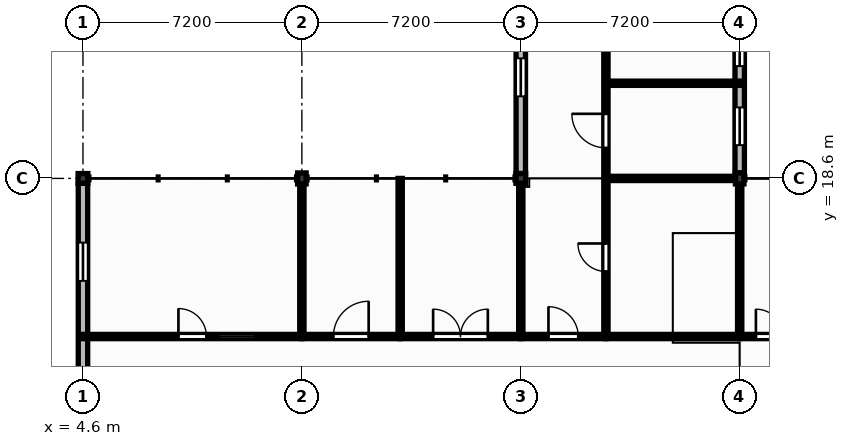
"""IFC4 building model, lengths in metres.
Left out: names, types, materials, properties, quantities, classifications, styles, units other than length and angle.
Written with IfcOpenShell. Run it as: python <this file> out.ifc"""

import sys

from ifc_helpers import new_model, si_unit, direction, frame, frame_2d, origin, origin_2d, place, context, subcontext, project, spatial, rectangle, extrude, element, fill, save


model = new_model("IFC4")
c1 = context("Model", 3, precision=1e-05, world=origin(), true_north=direction((0.0, 1.0)))
c2 = subcontext(c1, "Body", "Model", "MODEL_VIEW")
j1 = project(units=[si_unit("LENGTHUNIT", "METRE"), si_unit("PLANEANGLEUNIT", "RADIAN")], contexts=[c1])
p1 = place(None, origin())
s1 = spatial("IfcSite", under=j1, at=p1, CompositionType="ELEMENT")
p2 = place(p1, origin())
s2 = spatial("IfcBuilding", under=s1, at=p2, CompositionType="ELEMENT")
p3 = place(p2, frame((0.0, 0.0, 9.0)))
s3 = spatial("IfcBuildingStorey", under=s2, at=p3, CompositionType="ELEMENT", Elevation=9.0)
p4 = place(p3, frame((4.6, 18.6, 0.0), z_axis=(0.0, 0.0, 1.0), x_axis=(1.0, 0.0, 0.0)))
e1 = element("IfcColumn", 1, at=p4, inside=s3, PredefinedType="COLUMN", context=c2, shape_type="SweptSolid", body=[
    extrude(rectangle(XDim=0.32, YDim=0.32, at=origin_2d()), origin(), (0.0, 0.0, 1.0), 3.95),
])
p5 = place(p3, frame((11.8, 18.6, 0.0), z_axis=(0.0, 0.0, 1.0), x_axis=(1.0, 0.0, 0.0)))
e2 = element("IfcColumn", 2, at=p5, inside=s3, PredefinedType="COLUMN", context=c2, shape_type="SweptSolid", body=[
    extrude(rectangle(XDim=0.28, YDim=0.36, at=origin_2d()), origin(), (0.0, 0.0, 1.0), 3.95),
])
p6 = place(p3, frame((19.0, 18.6, 0.0), z_axis=(0.0, 0.0, 1.0), x_axis=(1.0, 0.0, 0.0)))
e3 = element("IfcColumn", 3, at=p6, inside=s3, PredefinedType="COLUMN", context=c2, shape_type="SweptSolid", body=[
    extrude(rectangle(XDim=0.32, YDim=0.32, at=origin_2d()), origin(), (0.0, 0.0, 1.0), 3.95),
])
p7 = place(p3, frame((26.2, 18.6, 0.0), z_axis=(0.0, 0.0, 1.0), x_axis=(1.0, 0.0, 0.0)))
e4 = element("IfcColumn", 4, at=p7, inside=s3, PredefinedType="COLUMN", context=c2, shape_type="SweptSolid", body=[
    extrude(rectangle(XDim=0.28, YDim=0.36, at=origin_2d()), origin(), (0.0, 0.0, 1.0), 3.95),
])
p8 = place(p3, frame((4.6, 11.58, 0.0), z_axis=(0.0, 0.0, 1.0), x_axis=(0.0, 1.0, 0.0)))
e5 = element("IfcWall", 5, at=p8, inside=s3, PredefinedType="SOLIDWALL", context=c2, shape_type="SweptSolid", body=[
    extrude(rectangle(XDim=6.86, YDim=0.31, at=frame_2d((3.43, 0.0))), origin(), (0.0, 0.0, 1.0), 3.49),
])
p9 = place(p8, frame((3.65, 0.0, 1.05)))
e6 = element("IfcOpeningElement", 6, at=p9, cuts=e5, PredefinedType="OPENING", context=c2, shape_type="SweptSolid", body=[
    extrude(rectangle(XDim=1.26, YDim=1.65, at=frame_2d((0.63, 0.825))), frame((0.0, 0.165, 0.0), z_axis=(0.0, -1.0, 0.0), x_axis=(1.0, 0.0, 0.0)), (0.0, 0.0, 1.0), 0.33),
])
p10 = place(p3, frame((19.0, 18.76, 0.0), z_axis=(0.0, 0.0, 1.0), x_axis=(0.0, 1.0, 0.0)))
e7 = element("IfcWall", 7, at=p10, inside=s3, PredefinedType="SOLIDWALL", context=c2, shape_type="SweptSolid", body=[
    extrude(rectangle(XDim=8.26, YDim=0.31, at=frame_2d((4.13, 0.0))), origin(), (0.0, 0.0, 1.0), 3.49),
])
p11 = place(p10, frame((2.54, 0.0, 1.35)))
e8 = element("IfcOpeningElement", 8, at=p11, cuts=e7, PredefinedType="OPENING", context=c2, shape_type="SweptSolid", body=[
    extrude(rectangle(XDim=1.25, YDim=1.4, at=frame_2d((0.625, 0.7))), frame((0.0, 0.165, 0.0), z_axis=(0.0, -1.0, 0.0), x_axis=(1.0, 0.0, 0.0)), (0.0, 0.0, 1.0), 0.33),
])
p12 = place(p10, frame((4.47, 0.0, 1.35)))
e9 = element("IfcOpeningElement", 9, at=p12, cuts=e7, PredefinedType="OPENING", context=c2, shape_type="SweptSolid", body=[
    extrude(rectangle(XDim=1.25, YDim=1.4, at=frame_2d((0.625, 0.7))), frame((0.0, 0.165, 0.0), z_axis=(0.0, -1.0, 0.0), x_axis=(1.0, 0.0, 0.0)), (0.0, 0.0, 1.0), 0.33),
])
p13 = place(p3, frame((26.2, 18.78, 0.0), z_axis=(0.0, 0.0, 1.0), x_axis=(0.0, 1.0, 0.0)))
e10 = element("IfcWall", 10, at=p13, inside=s3, PredefinedType="SOLIDWALL", context=c2, shape_type="SweptSolid", body=[
    extrude(rectangle(XDim=8.24, YDim=0.31, at=frame_2d((4.12, 0.0))), origin(), (0.0, 0.0, 1.0), 3.49),
])
p14 = place(p13, frame((0.915, 0.0, 1.0)))
e11 = element("IfcOpeningElement", 11, at=p14, cuts=e10, PredefinedType="OPENING", context=c2, shape_type="SweptSolid", body=[
    extrude(rectangle(XDim=1.24, YDim=1.8, at=frame_2d((0.62, 0.9))), frame((0.0, 0.165, 0.0), z_axis=(0.0, -1.0, 0.0), x_axis=(1.0, 0.0, 0.0)), (0.0, 0.0, 1.0), 0.33),
])
p15 = place(p13, frame((3.515, 0.0, 1.5)))
e12 = element("IfcOpeningElement", 12, at=p15, cuts=e10, PredefinedType="OPENING", context=c2, shape_type="SweptSolid", body=[
    extrude(rectangle(XDim=1.68, YDim=1.25, at=frame_2d((0.84, 0.625))), frame((0.0, 0.165, 0.0), z_axis=(0.0, -1.0, 0.0), x_axis=(1.0, 0.0, 0.0)), (0.0, 0.0, 1.0), 0.33),
])
p16 = place(p13, frame((5.875, 0.0, 1.5)))
e13 = element("IfcOpeningElement", 13, at=p16, cuts=e10, PredefinedType="OPENING", context=c2, shape_type="SweptSolid", body=[
    extrude(rectangle(XDim=1.68, YDim=1.25, at=frame_2d((0.84, 0.625))), frame((0.0, 0.165, 0.0), z_axis=(0.0, -1.0, 0.0), x_axis=(1.0, 0.0, 0.0)), (0.0, 0.0, 1.0), 0.33),
])
p17 = place(p3, frame((4.6, 13.4, 0.0), z_axis=(0.0, 0.0, 1.0), x_axis=(1.0, 0.0, 0.0)))
e14 = element("IfcWall", 14, at=p17, inside=s3, PredefinedType="PARTITIONING", context=c2, shape_type="SweptSolid", body=[
    extrude(rectangle(XDim=7.2, YDim=0.14, at=frame_2d((3.6, 0.0))), origin(), (0.0, 0.0, 1.0), 3.91),
])
p18 = place(p17, frame((3.14, 0.0, 0.0)))
e15 = element("IfcOpeningElement", 15, at=p18, cuts=e14, PredefinedType="OPENING", context=c2, shape_type="SweptSolid", body=[
    extrude(rectangle(XDim=0.92, YDim=2.1, at=frame_2d((0.46, 1.05))), frame((0.0, 0.08, 0.0), z_axis=(0.0, -1.0, 0.0), x_axis=(1.0, 0.0, 0.0)), (0.0, 0.0, 1.0), 0.16),
])
p19 = place(p17, frame((4.46, 0.0, 1.05)))
e16 = element("IfcOpeningElement", 16, at=p19, cuts=e14, PredefinedType="OPENING", context=c2, shape_type="SweptSolid", body=[
    extrude(rectangle(XDim=1.2, YDim=1.1, at=frame_2d((0.6, 0.55))), frame((0.0, 0.08, 0.0), z_axis=(0.0, -1.0, 0.0), x_axis=(1.0, 0.0, 0.0)), (0.0, 0.0, 1.0), 0.16),
])
p20 = place(p3, frame((11.8, 13.47, 0.0), z_axis=(0.0, 0.0, 1.0), x_axis=(0.0, 1.0, 0.0)))
e17 = element("IfcWall", 17, at=p20, inside=s3, PredefinedType="PARTITIONING", context=c2, shape_type="SweptSolid", body=[
    extrude(rectangle(XDim=4.95, YDim=0.14, at=frame_2d((2.475, 0.0))), origin(), (0.0, 0.0, 1.0), 3.49),
])
p21 = place(p3, frame((11.8, 13.4, 0.0), z_axis=(0.0, 0.0, 1.0), x_axis=(1.0, 0.0, 0.0)))
e18 = element("IfcWall", 18, at=p21, inside=s3, PredefinedType="PARTITIONING", context=c2, shape_type="SweptSolid", body=[
    extrude(rectangle(XDim=3.233, YDim=0.14, at=frame_2d((1.616, 0.0))), origin(), (0.0, 0.0, 1.0), 3.91),
])
p22 = place(p21, frame((1.037, 0.0, 0.0)))
e19 = element("IfcOpeningElement", 19, at=p22, cuts=e18, PredefinedType="OPENING", context=c2, shape_type="SweptSolid", body=[
    extrude(rectangle(XDim=1.16, YDim=2.1, at=frame_2d((0.58, 1.05))), frame((0.0, 0.08, 0.0), z_axis=(0.0, -1.0, 0.0), x_axis=(1.0, 0.0, 0.0)), (0.0, 0.0, 1.0), 0.16),
])
p23 = place(p3, frame((15.033, 13.47, 0.0), z_axis=(0.0, 0.0, 1.0), x_axis=(0.0, 1.0, 0.0)))
e20 = element("IfcWall", 20, at=p23, inside=s3, PredefinedType="PARTITIONING", context=c2, shape_type="SweptSolid", body=[
    extrude(rectangle(XDim=5.13, YDim=0.14, at=frame_2d((2.565, 0.0))), origin(), (0.0, 0.0, 1.0), 3.91),
])
p24 = place(p3, frame((15.033, 13.4, 0.0), z_axis=(0.0, 0.0, 1.0), x_axis=(1.0, 0.0, 0.0)))
e21 = element("IfcWall", 21, at=p24, inside=s3, PredefinedType="PARTITIONING", context=c2, shape_type="SweptSolid", body=[
    extrude(rectangle(XDim=3.967, YDim=0.14, at=frame_2d((1.983, 0.0))), origin(), (0.0, 0.0, 1.0), 3.91),
])
p25 = place(p24, frame((1.083, 0.0, 0.0)))
e22 = element("IfcOpeningElement", 22, at=p25, cuts=e21, PredefinedType="OPENING", context=c2, shape_type="SweptSolid", body=[
    extrude(rectangle(XDim=1.8, YDim=2.3, at=frame_2d((0.9, 1.15))), frame((0.0, 0.08, 0.0), z_axis=(0.0, -1.0, 0.0), x_axis=(1.0, 0.0, 0.0)), (0.0, 0.0, 1.0), 0.16),
])
p26 = place(p3, frame((19.0, 13.47, 0.0), z_axis=(0.0, 0.0, 1.0), x_axis=(0.0, 1.0, 0.0)))
e23 = element("IfcWall", 23, at=p26, inside=s3, PredefinedType="PARTITIONING", context=c2, shape_type="SweptSolid", body=[
    extrude(rectangle(XDim=4.97, YDim=0.14, at=frame_2d((2.485, 0.0))), origin(), (0.0, 0.0, 1.0), 3.49),
])
p27 = place(p3, frame((19.0, 13.4, 0.0), z_axis=(0.0, 0.0, 1.0), x_axis=(1.0, 0.0, 0.0)))
e24 = element("IfcWall", 24, at=p27, inside=s3, PredefinedType="PARTITIONING", context=c2, shape_type="SweptSolid", body=[
    extrude(rectangle(XDim=2.8, YDim=0.14, at=frame_2d((1.4, 0.0))), origin(), (0.0, 0.0, 1.0), 3.96),
])
p28 = place(p27, frame((0.91, 0.0, 0.0)))
e25 = element("IfcOpeningElement", 25, at=p28, cuts=e24, PredefinedType="OPENING", context=c2, shape_type="SweptSolid", body=[
    extrude(rectangle(XDim=0.98, YDim=2.15, at=frame_2d((0.49, 1.075))), frame((0.0, 0.08, 0.0), z_axis=(0.0, -1.0, 0.0), x_axis=(1.0, 0.0, 0.0)), (0.0, 0.0, 1.0), 0.16),
])
p29 = place(p3, frame((21.8, 13.47, 0.0), z_axis=(0.0, 0.0, 1.0), x_axis=(0.0, 1.0, 0.0)))
e26 = element("IfcWall", 26, at=p29, inside=s3, PredefinedType="PARTITIONING", context=c2, shape_type="SweptSolid", body=[
    extrude(rectangle(XDim=5.06, YDim=0.14, at=frame_2d((2.53, 0.0))), origin(), (0.0, 0.0, 1.0), 3.91),
])
p30 = place(p29, frame((2.07, 0.0, 0.0)))
e27 = element("IfcOpeningElement", 27, at=p30, cuts=e26, PredefinedType="OPENING", context=c2, shape_type="SweptSolid", body=[
    extrude(rectangle(XDim=0.92, YDim=2.1, at=frame_2d((0.46, 1.05))), frame((0.0, 0.08, 0.0), z_axis=(0.0, -1.0, 0.0), x_axis=(1.0, 0.0, 0.0)), (0.0, 0.0, 1.0), 0.16),
])
p31 = place(p3, frame((21.8, 13.4, 0.0), z_axis=(0.0, 0.0, 1.0), x_axis=(1.0, 0.0, 0.0)))
e28 = element("IfcWall", 28, at=p31, inside=s3, PredefinedType="PARTITIONING", context=c2, shape_type="SweptSolid", body=[
    extrude(rectangle(XDim=4.4, YDim=0.14, at=frame_2d((2.2, 0.0))), origin(), (0.0, 0.0, 1.0), 3.91),
])
p32 = place(p3, frame((21.8, 18.67, 0.0), z_axis=(0.0, 0.0, 1.0), x_axis=(0.0, 1.0, 0.0)))
e29 = element("IfcWall", 29, at=p32, inside=s3, PredefinedType="PARTITIONING", context=c2, shape_type="SweptSolid", body=[
    extrude(rectangle(XDim=2.99, YDim=0.14, at=frame_2d((1.495, 0.0))), origin(), (0.0, 0.0, 1.0), 3.96),
])
p33 = place(p32, frame((0.935, 0.0, 0.0)))
e30 = element("IfcOpeningElement", 30, at=p33, cuts=e29, PredefinedType="OPENING", context=c2, shape_type="SweptSolid", body=[
    extrude(rectangle(XDim=1.12, YDim=2.15, at=frame_2d((0.56, 1.075))), frame((0.0, 0.08, 0.0), z_axis=(0.0, -1.0, 0.0), x_axis=(1.0, 0.0, 0.0)), (0.0, 0.0, 1.0), 0.16),
])
p34 = place(p3, frame((21.8, 18.6, 0.0), z_axis=(0.0, 0.0, 1.0), x_axis=(1.0, 0.0, 0.0)))
e31 = element("IfcWall", 31, at=p34, inside=s3, PredefinedType="PARTITIONING", context=c2, shape_type="SweptSolid", body=[
    extrude(rectangle(XDim=4.26, YDim=0.14, at=frame_2d((2.13, 0.0))), origin(), (0.0, 0.0, 1.0), 3.49),
])
p35 = place(p3, frame((21.8, 21.8, 0.0), z_axis=(0.0, 0.0, 1.0), x_axis=(0.0, 1.0, 0.0)))
e32 = element("IfcWall", 32, at=p35, inside=s3, PredefinedType="PARTITIONING", context=c2, shape_type="SweptSolid", body=[
    extrude(rectangle(XDim=5.33, YDim=0.14, at=frame_2d((2.665, 0.0))), origin(), (0.0, 0.0, 1.0), 3.96),
])
p36 = place(p35, frame((2.205, 0.0, 0.0)))
e33 = element("IfcOpeningElement", 33, at=p36, cuts=e32, PredefinedType="OPENING", context=c2, shape_type="SweptSolid", body=[
    extrude(rectangle(XDim=0.92, YDim=2.1, at=frame_2d((0.46, 1.05))), frame((0.0, 0.08, 0.0), z_axis=(0.0, -1.0, 0.0), x_axis=(1.0, 0.0, 0.0)), (0.0, 0.0, 1.0), 0.16),
])
p37 = place(p3, frame((21.8, 21.73, 0.0), z_axis=(0.0, 0.0, 1.0), x_axis=(1.0, 0.0, 0.0)))
e34 = element("IfcWall", 34, at=p37, inside=s3, PredefinedType="PARTITIONING", context=c2, shape_type="SweptSolid", body=[
    extrude(rectangle(XDim=4.4, YDim=0.14, at=frame_2d((2.2, 0.0))), origin(), (0.0, 0.0, 1.0), 3.96),
])
p38 = place(p3, frame((26.2, 13.47, 0.0), z_axis=(0.0, 0.0, 1.0), x_axis=(0.0, 1.0, 0.0)))
e35 = element("IfcWall", 35, at=p38, inside=s3, PredefinedType="PARTITIONING", context=c2, shape_type="SweptSolid", body=[
    extrude(rectangle(XDim=4.95, YDim=0.14, at=frame_2d((2.475, 0.0))), origin(), (0.0, 0.0, 1.0), 3.49),
])
p39 = place(p3, frame((26.2, 13.4, 0.0), z_axis=(0.0, 0.0, 1.0), x_axis=(1.0, 0.0, 0.0)))
e36 = element("IfcWall", 36, at=p39, inside=s3, PredefinedType="PARTITIONING", context=c2, shape_type="SweptSolid", body=[
    extrude(rectangle(XDim=2.866, YDim=0.14, at=frame_2d((1.433, 0.0))), origin(), (0.0, 0.0, 1.0), 3.91),
])
p40 = place(p39, frame((0.533, 0.0, 0.0)))
e37 = element("IfcOpeningElement", 37, at=p40, cuts=e36, PredefinedType="OPENING", context=c2, shape_type="SweptSolid", body=[
    extrude(rectangle(XDim=1.8, YDim=2.3, at=frame_2d((0.9, 1.15))), frame((0.0, 0.08, 0.0), z_axis=(0.0, -1.0, 0.0), x_axis=(1.0, 0.0, 0.0)), (0.0, 0.0, 1.0), 0.16),
])
p41 = place(p9, origin())
e38 = element("IfcWindow", 38, at=p41, inside=s3, PartitioningType="SINGLE_PANEL", PredefinedType="WINDOW", context=c2, shape_type="SweptSolid", body=[
    extrude(rectangle(XDim=1.26, YDim=1.65, at=frame_2d((0.63, 0.825))), frame((0.0, 0.03, 0.0), z_axis=(0.0, -1.0, 0.0), x_axis=(1.0, 0.0, 0.0)), (0.0, 0.0, 1.0), 0.06),
])
fill(e6, e38)
p42 = place(p11, origin())
e39 = element("IfcWindow", 39, at=p42, inside=s3, PartitioningType="SINGLE_PANEL", PredefinedType="WINDOW", context=c2, shape_type="SweptSolid", body=[
    extrude(rectangle(XDim=1.25, YDim=1.4, at=frame_2d((0.625, 0.7))), frame((0.0, 0.03, 0.0), z_axis=(0.0, -1.0, 0.0), x_axis=(1.0, 0.0, 0.0)), (0.0, 0.0, 1.0), 0.06),
])
fill(e8, e39)
p43 = place(p14, origin())
e40 = element("IfcWindow", 40, at=p43, inside=s3, PartitioningType="SINGLE_PANEL", PredefinedType="WINDOW", context=c2, shape_type="SweptSolid", body=[
    extrude(rectangle(XDim=1.24, YDim=1.8, at=frame_2d((0.62, 0.9))), frame((0.0, 0.03, 0.0), z_axis=(0.0, -1.0, 0.0), x_axis=(1.0, 0.0, 0.0)), (0.0, 0.0, 1.0), 0.06),
])
fill(e11, e40)
p44 = place(p15, origin())
e41 = element("IfcWindow", 41, at=p44, inside=s3, PartitioningType="DOUBLE_PANEL_VERTICAL", PredefinedType="WINDOW", context=c2, shape_type="SweptSolid", body=[
    extrude(rectangle(XDim=1.68, YDim=1.25, at=frame_2d((0.84, 0.625))), frame((0.0, 0.03, 0.0), z_axis=(0.0, -1.0, 0.0), x_axis=(1.0, 0.0, 0.0)), (0.0, 0.0, 1.0), 0.06),
])
fill(e12, e41)
p45 = place(p28, origin())
e42 = element("IfcDoor", 42, at=p45, inside=s3, OperationType="SINGLE_SWING_LEFT", PredefinedType="DOOR", context=c2, shape_type="SweptSolid", body=[
    extrude(rectangle(XDim=0.98, YDim=2.15, at=frame_2d((0.49, 1.075))), frame((0.0, 0.025, 0.0), z_axis=(0.0, -1.0, 0.0), x_axis=(1.0, 0.0, 0.0)), (0.0, 0.0, 1.0), 0.05),
])
fill(e25, e42)
p46 = place(p33, origin())
e43 = element("IfcDoor", 43, at=p46, inside=s3, OperationType="SINGLE_SWING_RIGHT", PredefinedType="DOOR", context=c2, shape_type="SweptSolid", body=[
    extrude(rectangle(XDim=1.12, YDim=2.15, at=frame_2d((0.56, 1.075))), frame((0.0, 0.025, 0.0), z_axis=(0.0, -1.0, 0.0), x_axis=(1.0, 0.0, 0.0)), (0.0, 0.0, 1.0), 0.05),
])
fill(e30, e43)
p47 = place(p18, origin())
e44 = element("IfcDoor", 44, at=p47, inside=s3, OperationType="SINGLE_SWING_LEFT", PredefinedType="DOOR", context=c2, shape_type="SweptSolid", body=[
    extrude(rectangle(XDim=0.92, YDim=2.1, at=frame_2d((0.46, 1.05))), frame((0.0, 0.025, 0.0), z_axis=(0.0, -1.0, 0.0), x_axis=(1.0, 0.0, 0.0)), (0.0, 0.0, 1.0), 0.05),
])
fill(e15, e44)
p48 = place(p19, origin())
e45 = element("IfcWindow", 45, at=p48, inside=s3, PartitioningType="SINGLE_PANEL", PredefinedType="WINDOW", context=c2, shape_type="SweptSolid", body=[
    extrude(rectangle(XDim=1.2, YDim=1.1, at=frame_2d((0.6, 0.55))), frame((0.0, 0.03, 0.0), z_axis=(0.0, -1.0, 0.0), x_axis=(1.0, 0.0, 0.0)), (0.0, 0.0, 1.0), 0.06),
])
fill(e16, e45)
p49 = place(p22, origin())
e46 = element("IfcDoor", 46, at=p49, inside=s3, OperationType="SINGLE_SWING_RIGHT", PredefinedType="DOOR", context=c2, shape_type="SweptSolid", body=[
    extrude(rectangle(XDim=1.16, YDim=2.1, at=frame_2d((0.58, 1.05))), frame((0.0, 0.025, 0.0), z_axis=(0.0, -1.0, 0.0), x_axis=(1.0, 0.0, 0.0)), (0.0, 0.0, 1.0), 0.05),
])
fill(e19, e46)
p50 = place(p25, origin())
e47 = element("IfcDoor", 47, at=p50, inside=s3, OperationType="DOUBLE_DOOR_SINGLE_SWING", PredefinedType="DOOR", context=c2, shape_type="SweptSolid", body=[
    extrude(rectangle(XDim=1.8, YDim=2.3, at=frame_2d((0.9, 1.15))), frame((0.0, 0.025, 0.0), z_axis=(0.0, -1.0, 0.0), x_axis=(1.0, 0.0, 0.0)), (0.0, 0.0, 1.0), 0.05),
])
fill(e22, e47)
p51 = place(p30, origin())
e48 = element("IfcDoor", 48, at=p51, inside=s3, OperationType="SINGLE_SWING_RIGHT", PredefinedType="DOOR", context=c2, shape_type="SweptSolid", body=[
    extrude(rectangle(XDim=0.92, YDim=2.1, at=frame_2d((0.46, 1.05))), frame((0.0, 0.025, 0.0), z_axis=(0.0, -1.0, 0.0), x_axis=(1.0, 0.0, 0.0)), (0.0, 0.0, 1.0), 0.05),
])
fill(e27, e48)
p52 = place(p40, origin())
e49 = element("IfcDoor", 49, at=p52, inside=s3, OperationType="DOUBLE_DOOR_SINGLE_SWING", PredefinedType="DOOR", context=c2, shape_type="SweptSolid", body=[
    extrude(rectangle(XDim=1.8, YDim=2.3, at=frame_2d((0.9, 1.15))), frame((0.0, 0.025, 0.0), z_axis=(0.0, -1.0, 0.0), x_axis=(1.0, 0.0, 0.0)), (0.0, 0.0, 1.0), 0.05),
])
fill(e37, e49)
save(model, sys.argv[1])
